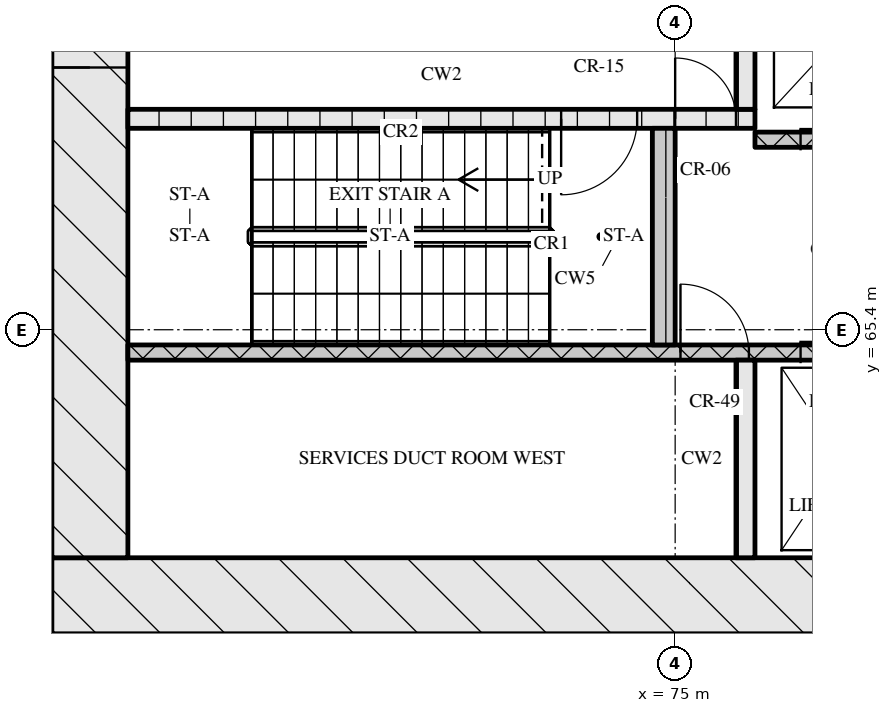
"""IFC4 building model, lengths in metres.
Left out: names, types, materials, properties, quantities, classifications, styles, units other than length and angle.
Written with IfcOpenShell. Run it as: python <this file> out.ifc"""

import sys

from ifc_helpers import new_model, si_unit, direction, frame, frame_2d, origin, place, context, subcontext, project, spatial, rectangle, extrude, element, fill, save


model = new_model("IFC4")
c1 = context("Model", 3, precision=1e-05, world=origin(), true_north=direction((0.0, 1.0)))
c2 = subcontext(c1, "Body", "Model", "MODEL_VIEW")
j1 = project(units=[si_unit("LENGTHUNIT", "METRE"), si_unit("PLANEANGLEUNIT", "RADIAN")], contexts=[c1])
p1 = place(None, origin())
s1 = spatial("IfcSite", under=j1, at=p1, CompositionType="ELEMENT")
p2 = place(p1, origin())
s2 = spatial("IfcBuilding", under=s1, at=p2, CompositionType="ELEMENT")
p3 = place(p2, frame((0.0, 0.0, 84.0)))
s3 = spatial("IfcBuildingStorey", under=s2, at=p3, CompositionType="ELEMENT", Elevation=84.0)
p4 = place(p3, frame((66.8, 61.9, 0.0), z_axis=(0.0, 0.0, 1.0), x_axis=(1.0, 0.0, 0.0)))
e1 = element("IfcWall", 1, at=p4, inside=s3, PredefinedType="SOLIDWALL", context=c2, shape_type="SweptSolid", body=[
    extrude(rectangle(XDim=41.6, YDim=1.0, at=frame_2d((20.8, 0.0))), origin(), (0.0, 0.0, 1.0), 10.97),
])
p5 = place(p4, frame((21.15, 0.0, 0.0)))
e2 = element("IfcOpeningElement", 2, at=p5, cuts=e1, PredefinedType="OPENING", context=c2, shape_type="SweptSolid", body=[
    extrude(rectangle(XDim=1.8, YDim=2.1, at=frame_2d((0.9, 1.05))), frame((0.0, 0.51, 0.0), z_axis=(0.0, -1.0, 0.0), x_axis=(1.0, 0.0, 0.0)), (0.0, 0.0, 1.0), 1.02),
])
p6 = place(p3, frame((67.3, 62.4, 0.0), z_axis=(0.0, 0.0, 1.0), x_axis=(0.0, 1.0, 0.0)))
e3 = element("IfcWall", 3, at=p6, inside=s3, PredefinedType="SOLIDWALL", context=c2, shape_type="SweptSolid", body=[
    extrude(rectangle(XDim=12.0, YDim=1.0, at=frame_2d((6.0, 0.0))), origin(), (0.0, 0.0, 1.0), 10.97),
])
p7 = place(p6, frame((6.45, 0.0, 0.0)))
e4 = element("IfcOpeningElement", 4, at=p7, cuts=e3, PredefinedType="OPENING", context=c2, shape_type="SweptSolid", body=[
    extrude(rectangle(XDim=1.2, YDim=2.1, at=frame_2d((0.6, 1.05))), frame((0.0, 0.51, 0.0), z_axis=(0.0, -1.0, 0.0), x_axis=(1.0, 0.0, 0.0)), (0.0, 0.0, 1.0), 1.02),
])
p8 = place(p3, frame((75.925, 62.4, 0.0), z_axis=(0.0, 0.0, 1.0), x_axis=(0.0, 1.0, 0.0)))
e5 = element("IfcWall", 5, at=p8, inside=s3, PredefinedType="SOLIDWALL", context=c2, shape_type="SweptSolid", body=[
    extrude(rectangle(XDim=2.6, YDim=0.25, at=frame_2d((1.3, 0.0))), origin(), (0.0, 0.0, 1.0), 10.97),
])
p9 = place(p3, frame((67.8, 65.1, 0.0), z_axis=(0.0, 0.0, 1.0), x_axis=(1.0, 0.0, 0.0)))
e6 = element("IfcWall", 6, at=p9, inside=s3, PredefinedType="SOLIDWALL", context=c2, shape_type="SweptSolid", body=[
    extrude(rectangle(XDim=18.5, YDim=0.2, at=frame_2d((9.25, 0.0))), origin(), (0.0, 0.0, 1.0), 10.97),
])
p10 = place(p9, frame((7.27, 0.0, 0.0)))
e7 = element("IfcOpeningElement", 7, at=p10, cuts=e6, PredefinedType="OPENING", context=c2, shape_type="SweptSolid", body=[
    extrude(rectangle(XDim=0.9, YDim=2.1, at=frame_2d((0.45, 1.05))), frame((0.0, 0.11, 0.0), z_axis=(0.0, -1.0, 0.0), x_axis=(1.0, 0.0, 0.0)), (0.0, 0.0, 1.0), 0.22),
])
p11 = place(p9, frame((8.85, 0.0, 0.0)))
e8 = element("IfcOpeningElement", 8, at=p11, cuts=e6, PredefinedType="OPENING", context=c2, shape_type="SweptSolid", body=[
    extrude(rectangle(XDim=1.1, YDim=2.1, at=frame_2d((0.55, 1.05))), frame((0.0, 0.11, 0.0), z_axis=(0.0, -1.0, 0.0), x_axis=(1.0, 0.0, 0.0)), (0.0, 0.0, 1.0), 0.22),
])
p12 = place(p9, frame((11.35, 0.0, 0.0)))
e9 = element("IfcOpeningElement", 9, at=p12, cuts=e6, PredefinedType="OPENING", context=c2, shape_type="SweptSolid", body=[
    extrude(rectangle(XDim=1.1, YDim=2.1, at=frame_2d((0.55, 1.05))), frame((0.0, 0.11, 0.0), z_axis=(0.0, -1.0, 0.0), x_axis=(1.0, 0.0, 0.0)), (0.0, 0.0, 1.0), 0.22),
])
p13 = place(p9, frame((13.85, 0.0, 0.0)))
e10 = element("IfcOpeningElement", 10, at=p13, cuts=e6, PredefinedType="OPENING", context=c2, shape_type="SweptSolid", body=[
    extrude(rectangle(XDim=1.1, YDim=2.1, at=frame_2d((0.55, 1.05))), frame((0.0, 0.11, 0.0), z_axis=(0.0, -1.0, 0.0), x_axis=(1.0, 0.0, 0.0)), (0.0, 0.0, 1.0), 0.22),
])
p14 = place(p9, frame((16.7, 0.0, 0.0)))
e11 = element("IfcOpeningElement", 11, at=p14, cuts=e6, PredefinedType="OPENING", context=c2, shape_type="SweptSolid", body=[
    extrude(rectangle(XDim=0.9, YDim=2.1, at=frame_2d((0.45, 1.05))), frame((0.0, 0.11, 0.0), z_axis=(0.0, -1.0, 0.0), x_axis=(1.0, 0.0, 0.0)), (0.0, 0.0, 1.0), 0.22),
])
p15 = place(p3, frame((74.85, 65.2, 0.0), z_axis=(0.0, 0.0, 1.0), x_axis=(0.0, 1.0, 0.0)))
e12 = element("IfcWall", 12, at=p15, inside=s3, PredefinedType="SOLIDWALL", context=c2, shape_type="SweptSolid", body=[
    extrude(rectangle(XDim=2.85, YDim=0.3, at=frame_2d((1.425, 0.0))), origin(), (0.0, 0.0, 1.0), 10.97),
])
p16 = place(p3, frame((76.05, 67.9, 0.0), z_axis=(0.0, 0.0, 1.0), x_axis=(1.0, 0.0, 0.0)))
e13 = element("IfcWall", 13, at=p16, inside=s3, PredefinedType="SOLIDWALL", context=c2, shape_type="SweptSolid", body=[
    extrude(rectangle(XDim=23.1, YDim=0.2, at=frame_2d((11.55, 0.0))), origin(), (0.0, 0.0, 1.0), 10.97),
])
p17 = place(p16, frame((0.6, 0.0, 0.0)))
e14 = element("IfcOpeningElement", 14, at=p17, cuts=e13, PredefinedType="OPENING", context=c2, shape_type="SweptSolid", body=[
    extrude(rectangle(XDim=1.1, YDim=2.1, at=frame_2d((0.55, 1.05))), frame((0.0, 0.11, 0.0), z_axis=(0.0, -1.0, 0.0), x_axis=(1.0, 0.0, 0.0)), (0.0, 0.0, 1.0), 0.22),
])
p18 = place(p16, frame((3.1, 0.0, 0.0)))
e15 = element("IfcOpeningElement", 15, at=p18, cuts=e13, PredefinedType="OPENING", context=c2, shape_type="SweptSolid", body=[
    extrude(rectangle(XDim=1.1, YDim=2.1, at=frame_2d((0.55, 1.05))), frame((0.0, 0.11, 0.0), z_axis=(0.0, -1.0, 0.0), x_axis=(1.0, 0.0, 0.0)), (0.0, 0.0, 1.0), 0.22),
])
p19 = place(p16, frame((5.6, 0.0, 0.0)))
e16 = element("IfcOpeningElement", 16, at=p19, cuts=e13, PredefinedType="OPENING", context=c2, shape_type="SweptSolid", body=[
    extrude(rectangle(XDim=1.1, YDim=2.1, at=frame_2d((0.55, 1.05))), frame((0.0, 0.11, 0.0), z_axis=(0.0, -1.0, 0.0), x_axis=(1.0, 0.0, 0.0)), (0.0, 0.0, 1.0), 0.22),
])
p20 = place(p16, frame((8.45, 0.0, 0.0)))
e17 = element("IfcOpeningElement", 17, at=p20, cuts=e13, PredefinedType="OPENING", context=c2, shape_type="SweptSolid", body=[
    extrude(rectangle(XDim=0.9, YDim=2.1, at=frame_2d((0.45, 1.05))), frame((0.0, 0.11, 0.0), z_axis=(0.0, -1.0, 0.0), x_axis=(1.0, 0.0, 0.0)), (0.0, 0.0, 1.0), 0.22),
])
p21 = place(p16, frame((10.91, 0.0, 0.0)))
e18 = element("IfcOpeningElement", 18, at=p21, cuts=e13, PredefinedType="OPENING", context=c2, shape_type="SweptSolid", body=[
    extrude(rectangle(XDim=0.9, YDim=2.1, at=frame_2d((0.45, 1.05))), frame((0.0, 0.11, 0.0), z_axis=(0.0, -1.0, 0.0), x_axis=(1.0, 0.0, 0.0)), (0.0, 0.0, 1.0), 0.22),
])
p22 = place(p16, frame((13.55, 0.0, 0.0)))
e19 = element("IfcOpeningElement", 19, at=p22, cuts=e13, PredefinedType="OPENING", context=c2, shape_type="SweptSolid", body=[
    extrude(rectangle(XDim=1.0, YDim=2.1, at=frame_2d((0.5, 1.05))), frame((0.0, 0.11, 0.0), z_axis=(0.0, -1.0, 0.0), x_axis=(1.0, 0.0, 0.0)), (0.0, 0.0, 1.0), 0.22),
])
p23 = place(p3, frame((67.8, 68.175, 0.0), z_axis=(0.0, 0.0, 1.0), x_axis=(1.0, 0.0, 0.0)))
e20 = element("IfcWall", 20, at=p23, inside=s3, PredefinedType="SOLIDWALL", context=c2, shape_type="SweptSolid", body=[
    extrude(rectangle(XDim=8.25, YDim=0.25, at=frame_2d((4.125, 0.0))), origin(), (0.0, 0.0, 1.0), 10.97),
])
p24 = place(p23, frame((5.7, 0.0, 0.0)))
e21 = element("IfcOpeningElement", 21, at=p24, cuts=e20, PredefinedType="OPENING", context=c2, shape_type="SweptSolid", body=[
    extrude(rectangle(XDim=1.0, YDim=2.1, at=frame_2d((0.5, 1.05))), frame((0.0, 0.135, 0.0), z_axis=(0.0, -1.0, 0.0), x_axis=(1.0, 0.0, 0.0)), (0.0, 0.0, 1.0), 0.27),
])
p25 = place(p23, frame((7.2, 0.0, 0.0)))
e22 = element("IfcOpeningElement", 22, at=p25, cuts=e20, PredefinedType="OPENING", context=c2, shape_type="SweptSolid", body=[
    extrude(rectangle(XDim=0.8, YDim=2.1, at=frame_2d((0.4, 1.05))), frame((0.0, 0.135, 0.0), z_axis=(0.0, -1.0, 0.0), x_axis=(1.0, 0.0, 0.0)), (0.0, 0.0, 1.0), 0.27),
])
p26 = place(p3, frame((75.925, 68.3, 0.0), z_axis=(0.0, 0.0, 1.0), x_axis=(0.0, 1.0, 0.0)))
e23 = element("IfcWall", 23, at=p26, inside=s3, PredefinedType="SOLIDWALL", context=c2, shape_type="SweptSolid", body=[
    extrude(rectangle(XDim=2.3, YDim=0.25, at=frame_2d((1.15, 0.0))), origin(), (0.0, 0.0, 1.0), 10.97),
])
p27 = place(p10, origin())
e24 = element("IfcDoor", 24, at=p27, inside=s3, OperationType="SINGLE_SWING_LEFT", PredefinedType="DOOR", context=c2, shape_type="SweptSolid", body=[
    extrude(rectangle(XDim=0.9, YDim=2.1, at=frame_2d((0.45, 1.05))), frame((0.0, 0.025, 0.0), z_axis=(0.0, -1.0, 0.0), x_axis=(1.0, 0.0, 0.0)), (0.0, 0.0, 1.0), 0.05),
])
fill(e7, e24)
p28 = place(p11, origin())
e25 = element("IfcDoor", 25, at=p28, inside=s3, OperationType="SLIDING_TO_LEFT", PredefinedType="DOOR", context=c2, shape_type="SweptSolid", body=[
    extrude(rectangle(XDim=1.1, YDim=2.1, at=frame_2d((0.55, 1.05))), frame((0.0, 0.025, 0.0), z_axis=(0.0, -1.0, 0.0), x_axis=(1.0, 0.0, 0.0)), (0.0, 0.0, 1.0), 0.05),
])
fill(e8, e25)
p29 = place(p17, origin())
e26 = element("IfcDoor", 26, at=p29, inside=s3, OperationType="SLIDING_TO_RIGHT", PredefinedType="DOOR", context=c2, shape_type="SweptSolid", body=[
    extrude(rectangle(XDim=1.1, YDim=2.1, at=frame_2d((0.55, 1.05))), frame((0.0, 0.025, 0.0), z_axis=(0.0, -1.0, 0.0), x_axis=(1.0, 0.0, 0.0)), (0.0, 0.0, 1.0), 0.05),
])
fill(e14, e26)
p30 = place(p24, origin())
e27 = element("IfcDoor", 27, at=p30, inside=s3, OperationType="SINGLE_SWING_RIGHT", PredefinedType="DOOR", context=c2, shape_type="SweptSolid", body=[
    extrude(rectangle(XDim=1.0, YDim=2.1, at=frame_2d((0.5, 1.05))), frame((0.0, 0.025, 0.0), z_axis=(0.0, -1.0, 0.0), x_axis=(1.0, 0.0, 0.0)), (0.0, 0.0, 1.0), 0.05),
])
fill(e21, e27)
p31 = place(p25, origin())
e28 = element("IfcDoor", 28, at=p31, inside=s3, OperationType="SINGLE_SWING_LEFT", PredefinedType="DOOR", context=c2, shape_type="SweptSolid", body=[
    extrude(rectangle(XDim=0.8, YDim=2.1, at=frame_2d((0.4, 1.05))), frame((0.0, 0.025, 0.0), z_axis=(0.0, -1.0, 0.0), x_axis=(1.0, 0.0, 0.0)), (0.0, 0.0, 1.0), 0.05),
])
fill(e22, e28)
p32 = place(p7, origin())
e29 = element("IfcDoor", 29, at=p32, inside=s3, OperationType="SINGLE_SWING_LEFT", PredefinedType="DOOR", context=c2, shape_type="SweptSolid", body=[
    extrude(rectangle(XDim=1.2, YDim=2.1, at=frame_2d((0.6, 1.05))), frame((0.0, 0.025, 0.0), z_axis=(0.0, -1.0, 0.0), x_axis=(1.0, 0.0, 0.0)), (0.0, 0.0, 1.0), 0.05),
])
fill(e4, e29)
save(model, sys.argv[1])
